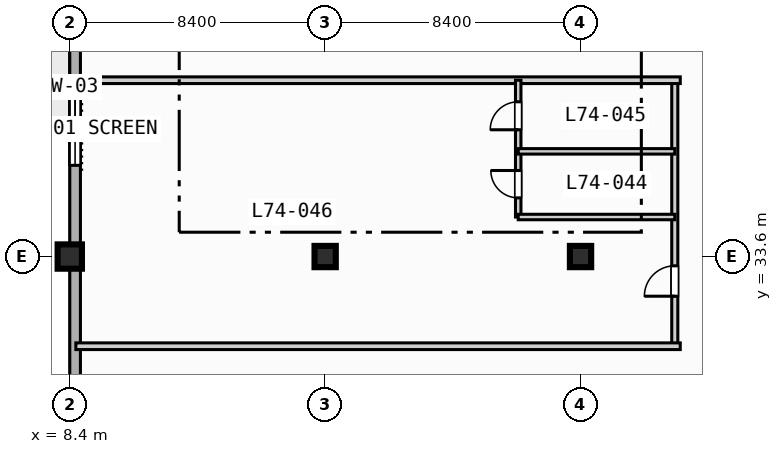
"""IFC4 building model, lengths in metres.
Left out: names, types, materials, properties, quantities, classifications, styles, units other than length and angle.
Written with IfcOpenShell. Run it as: python <this file> out.ifc"""

import sys

from ifc_helpers import new_model, si_unit, direction, frame, frame_2d, origin, origin_2d, place, context, subcontext, project, spatial, rectangle, extrude, element, fill, save


model = new_model("IFC4")
c1 = context("Model", 3, precision=1e-05, world=origin(), true_north=direction((0.0, 1.0)))
c2 = subcontext(c1, "Body", "Model", "MODEL_VIEW")
j1 = project(units=[si_unit("LENGTHUNIT", "METRE"), si_unit("PLANEANGLEUNIT", "RADIAN")], contexts=[c1])
p1 = place(None, origin())
s1 = spatial("IfcSite", under=j1, at=p1, CompositionType="ELEMENT")
p2 = place(p1, origin())
s2 = spatial("IfcBuilding", under=s1, at=p2, CompositionType="ELEMENT")
p3 = place(p2, frame((0.0, 0.0, 300.8)))
s3 = spatial("IfcBuildingStorey", under=s2, at=p3, CompositionType="ELEMENT", Elevation=300.8)
p4 = place(p3, frame((8.4, 33.6, 0.0), z_axis=(0.0, 0.0, 1.0), x_axis=(1.0, 0.0, 0.0)))
e1 = element("IfcColumn", 1, at=p4, inside=s3, PredefinedType="COLUMN", context=c2, shape_type="SweptSolid", body=[
    extrude(rectangle(XDim=0.8, YDim=0.8, at=origin_2d()), origin(), (0.0, 0.0, 1.0), 3.9),
])
for number, where, z_axis, x_axis in (
    (2, (16.8, 33.6, 0.0), (0.0, 0.0, 1.0), (1.0, 0.0, 0.0)),
    (3, (25.2, 33.6, 0.0), (0.0, 0.0, 1.0), (1.0, 0.0, 0.0)),
):
    element("IfcColumn", number, at=place(p3, frame(where, z_axis=z_axis, x_axis=x_axis)), inside=s3, PredefinedType="COLUMN", context=c2, shape_type="SweptSolid", body=[
        extrude(rectangle(XDim=0.7, YDim=0.7, at=origin_2d()), origin(), (0.0, 0.0, 1.0), 3.9),
    ])
p5 = place(p3, frame((8.575, 11.575, 0.0), z_axis=(0.0, 0.0, 1.0), x_axis=(0.0, 1.0, 0.0)))
e4 = element("IfcWall", 4, at=p5, inside=s3, PredefinedType="STANDARD", context=c2, shape_type="SweptSolid", body=[
    extrude(rectangle(XDim=60.85, YDim=0.35, at=frame_2d((30.425, 0.0))), origin(), (0.0, 0.0, 1.0), 3.67),
])
p6 = place(p5, frame((33.925, 0.0, 0.0)))
e5 = element("IfcOpeningElement", 5, at=p6, cuts=e4, PredefinedType="OPENING", context=c2, shape_type="SweptSolid", body=[
    extrude(rectangle(XDim=1.4, YDim=2.2, at=frame_2d((0.7, 1.1))), frame((0.0, 0.185, 0.0), z_axis=(0.0, -1.0, 0.0), x_axis=(1.0, 0.0, 0.0)), (0.0, 0.0, 1.0), 0.37),
])
p7 = place(p5, frame((25.025, 0.0, 0.85)))
e6 = element("IfcOpeningElement", 6, at=p7, cuts=e4, PredefinedType="OPENING", context=c2, shape_type="SweptSolid", body=[
    extrude(rectangle(XDim=2.4, YDim=1.95, at=frame_2d((1.2, 0.975))), frame((0.0, 0.185, 0.0), z_axis=(0.0, -1.0, 0.0), x_axis=(1.0, 0.0, 0.0)), (0.0, 0.0, 1.0), 0.37),
])
p8 = place(p5, frame((41.825, 0.0, 0.85)))
e7 = element("IfcOpeningElement", 7, at=p8, cuts=e4, PredefinedType="OPENING", context=c2, shape_type="SweptSolid", body=[
    extrude(rectangle(XDim=2.4, YDim=1.95, at=frame_2d((1.2, 0.975))), frame((0.0, 0.185, 0.0), z_axis=(0.0, -1.0, 0.0), x_axis=(1.0, 0.0, 0.0)), (0.0, 0.0, 1.0), 0.37),
])
p9 = place(p3, frame((28.3, 30.65, 0.0), z_axis=(0.0, 0.0, 1.0), x_axis=(0.0, 1.0, 0.0)))
e8 = element("IfcWall", 8, at=p9, inside=s3, PredefinedType="PARTITIONING", context=c2, shape_type="SweptSolid", body=[
    extrude(rectangle(XDim=8.75, YDim=0.2, at=frame_2d((4.375, 0.0))), origin(), (0.0, 0.0, 1.0), 3.67),
])
p10 = place(p9, frame((1.645, 0.0, 0.0)))
e9 = element("IfcOpeningElement", 9, at=p10, cuts=e8, PredefinedType="OPENING", context=c2, shape_type="SweptSolid", body=[
    extrude(rectangle(XDim=1.0, YDim=2.15, at=frame_2d((0.5, 1.075))), frame((0.0, 0.11, 0.0), z_axis=(0.0, -1.0, 0.0), x_axis=(1.0, 0.0, 0.0)), (0.0, 0.0, 1.0), 0.22),
])
for number, where, z_axis, x_axis in (
    (10, (8.6, 30.65, 0.0), (0.0, 0.0, 1.0), (1.0, 0.0, 0.0)),
    (11, (8.6, 39.4, 0.0), (0.0, 0.0, 1.0), (1.0, 0.0, 0.0)),
):
    element("IfcWall", number, at=place(p3, frame(where, z_axis=z_axis, x_axis=x_axis)), inside=s3, PredefinedType="PARTITIONING", context=c2, shape_type="SweptSolid", body=[
        extrude(rectangle(XDim=19.88, YDim=0.22, at=frame_2d((9.94, 0.0))), origin(), (0.0, 0.0, 1.0), 3.67),
    ])
p11 = place(p3, frame((23.15, 34.9, 0.0), z_axis=(0.0, 0.0, 1.0), x_axis=(0.0, 1.0, 0.0)))
e12 = element("IfcWall", 12, at=p11, inside=s3, PredefinedType="PLUMBINGWALL", context=c2, shape_type="SweptSolid", body=[
    extrude(rectangle(XDim=4.5, YDim=0.18, at=frame_2d((2.25, 0.0))), origin(), (0.0, 0.0, 1.0), 3.67),
])
p12 = place(p11, frame((0.63, 0.0, 0.0)))
e13 = element("IfcOpeningElement", 13, at=p12, cuts=e12, PredefinedType="OPENING", context=c2, shape_type="SweptSolid", body=[
    extrude(rectangle(XDim=0.9, YDim=2.1, at=frame_2d((0.45, 1.05))), frame((0.0, 0.1, 0.0), z_axis=(0.0, -1.0, 0.0), x_axis=(1.0, 0.0, 0.0)), (0.0, 0.0, 1.0), 0.2),
])
p13 = place(p11, frame((2.87, 0.0, 0.0)))
e14 = element("IfcOpeningElement", 14, at=p13, cuts=e12, PredefinedType="OPENING", context=c2, shape_type="SweptSolid", body=[
    extrude(rectangle(XDim=0.92, YDim=2.1, at=frame_2d((0.46, 1.05))), frame((0.0, 0.1, 0.0), z_axis=(0.0, -1.0, 0.0), x_axis=(1.0, 0.0, 0.0)), (0.0, 0.0, 1.0), 0.2),
])
for number, where, z_axis, x_axis in (
    (15, (23.15, 34.9, 0.0), (0.0, 0.0, 1.0), (1.0, 0.0, 0.0)),
    (16, (23.15, 37.06, 0.0), (0.0, 0.0, 1.0), (1.0, 0.0, 0.0)),
):
    element("IfcWall", number, at=place(p3, frame(where, z_axis=z_axis, x_axis=x_axis)), inside=s3, PredefinedType="PLUMBINGWALL", context=c2, shape_type="SweptSolid", body=[
        extrude(rectangle(XDim=5.15, YDim=0.18, at=frame_2d((2.575, 0.0))), origin(), (0.0, 0.0, 1.0), 3.67),
    ])
p14 = place(p7, origin())
e17 = element("IfcWindow", 17, at=p14, inside=s3, PartitioningType="SINGLE_PANEL", PredefinedType="WINDOW", context=c2, shape_type="SweptSolid", body=[
    extrude(rectangle(XDim=2.4, YDim=1.95, at=frame_2d((1.2, 0.975))), frame((0.0, 0.03, 0.0), z_axis=(0.0, -1.0, 0.0), x_axis=(1.0, 0.0, 0.0)), (0.0, 0.0, 1.0), 0.06),
])
fill(e6, e17)
p15 = place(p10, origin())
e18 = element("IfcDoor", 18, at=p15, inside=s3, OperationType="SINGLE_SWING_LEFT", PredefinedType="DOOR", context=c2, shape_type="SweptSolid", body=[
    extrude(rectangle(XDim=1.0, YDim=2.15, at=frame_2d((0.5, 1.075))), frame((0.0, 0.025, 0.0), z_axis=(0.0, -1.0, 0.0), x_axis=(1.0, 0.0, 0.0)), (0.0, 0.0, 1.0), 0.05),
])
fill(e9, e18)
p16 = place(p12, origin())
e19 = element("IfcDoor", 19, at=p16, inside=s3, OperationType="SINGLE_SWING_RIGHT", PredefinedType="DOOR", context=c2, shape_type="SweptSolid", body=[
    extrude(rectangle(XDim=0.9, YDim=2.1, at=frame_2d((0.45, 1.05))), frame((0.0, 0.025, 0.0), z_axis=(0.0, -1.0, 0.0), x_axis=(1.0, 0.0, 0.0)), (0.0, 0.0, 1.0), 0.05),
])
fill(e13, e19)
p17 = place(p13, origin())
e20 = element("IfcDoor", 20, at=p17, inside=s3, OperationType="SINGLE_SWING_LEFT", PredefinedType="DOOR", context=c2, shape_type="SweptSolid", body=[
    extrude(rectangle(XDim=0.92, YDim=2.1, at=frame_2d((0.46, 1.05))), frame((0.0, 0.025, 0.0), z_axis=(0.0, -1.0, 0.0), x_axis=(1.0, 0.0, 0.0)), (0.0, 0.0, 1.0), 0.05),
])
fill(e14, e20)
save(model, sys.argv[1])
